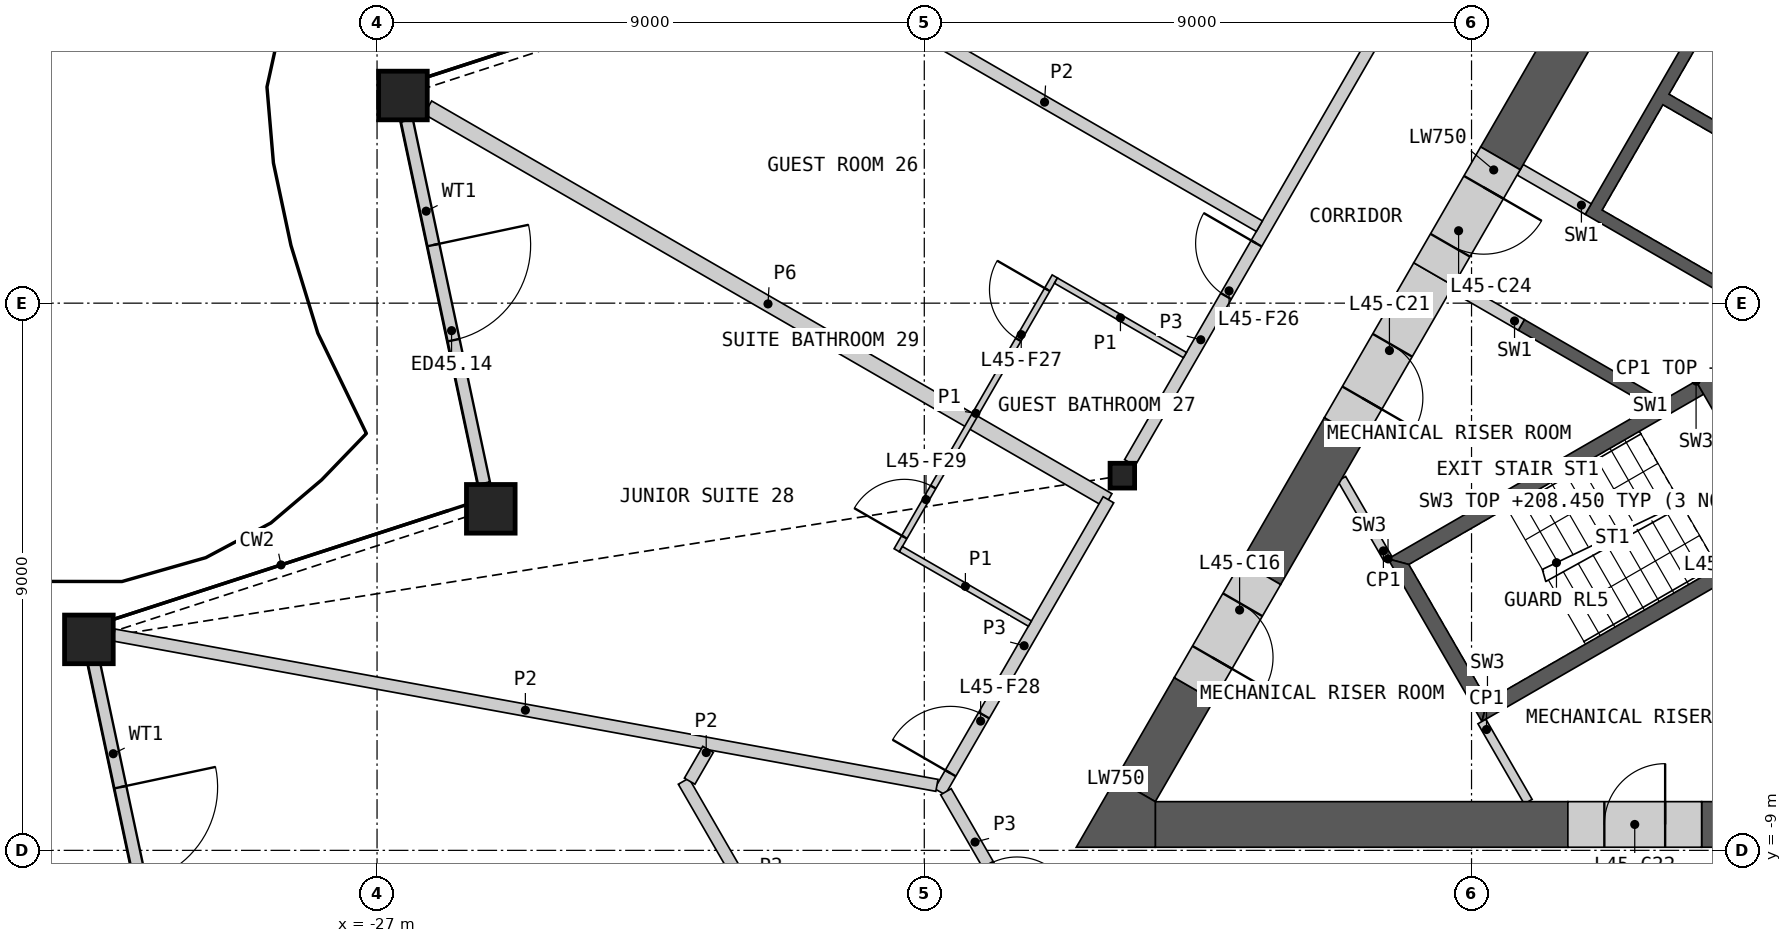
"""IFC4 building model, lengths in metres.
Left out: names, types, materials, properties, quantities, classifications, styles, units other than length and angle.
Written with IfcOpenShell. Run it as: python <this file> out.ifc"""

import sys

from ifc_helpers import new_model, si_unit, direction, frame, frame_2d, origin, origin_2d, place, context, subcontext, project, spatial, polyline, rectangle, hollow_rectangle, i_section, outline, extrude, element, fill, save


model = new_model("IFC4")
c1 = context("Model", 3, precision=1e-05, world=origin(), true_north=direction((0.0, 1.0)))
c2 = subcontext(c1, "Body", "Model", "MODEL_VIEW")
j1 = project(units=[si_unit("LENGTHUNIT", "METRE"), si_unit("PLANEANGLEUNIT", "RADIAN")], contexts=[c1])
p1 = place(None, origin())
s1 = spatial("IfcSite", under=j1, at=p1, CompositionType="ELEMENT")
p2 = place(p1, origin())
s2 = spatial("IfcBuilding", under=s1, at=p2, CompositionType="ELEMENT")
p3 = place(p2, frame((0.0, 0.0, 205.2)))
s3 = spatial("IfcBuildingStorey", under=s2, at=p3, CompositionType="ELEMENT", Elevation=205.2)
for number, where, z_axis, x_axis in (
    (1, (-26.574, 3.415, 0.0), (0.0, 0.0, 1.0), (1.0, 0.0, 0.0)),
    (2, (-25.129, -3.383, 0.0), (0.0, 0.0, 1.0), (1.0, 0.0, 0.0)),
    (3, (-31.739, -5.53, 0.0), (0.0, 0.0, 1.0), (1.0, 0.0, 0.0)),
):
    element("IfcColumn", number, at=place(p3, frame(where, z_axis=z_axis, x_axis=x_axis)), inside=s3, PredefinedType="COLUMN", context=c2, shape_type="SweptSolid", body=[
        extrude(hollow_rectangle(XDim=0.8, YDim=0.8, WallThickness=0.05, at=origin_2d()), origin(), (0.0, 0.0, 1.0), 3.6),
    ])
p4 = place(p3, frame((-14.743, -2.837, 0.0), z_axis=(0.0, 0.0, 1.0), x_axis=(1.0, 0.0, 0.0)))
e4 = element("IfcColumn", 4, at=p4, inside=s3, PredefinedType="COLUMN", context=c2, shape_type="SweptSolid", body=[
    extrude(i_section(OverallWidth=0.404, OverallDepth=0.407, WebThickness=0.027, FlangeThickness=0.044, at=origin_2d()), origin(), (0.0, 0.0, 1.0), 3.6),
])
p5 = place(p3, frame((-26.51, 3.006, 0.0), z_axis=(0.0, 0.0, 1.0), x_axis=(0.207920445063, -0.978145739921, 0.0)))
e5 = element("IfcWall", 5, at=p5, inside=s3, PredefinedType="SOLIDWALL", context=c2, shape_type="SweptSolid", body=[
    extrude(rectangle(XDim=6.106, YDim=0.2, at=frame_2d((3.053, 0.0))), origin(), (0.0, 0.0, 1.0), 2.701),
])
p6 = place(p5, frame((2.096, 0.0, 0.0)))
e6 = element("IfcOpeningElement", 6, at=p6, cuts=e5, PredefinedType="OPENING", context=c2, shape_type="SweptSolid", body=[
    extrude(rectangle(XDim=1.6, YDim=2.4, at=frame_2d((0.8, 1.2))), frame((0.0, 0.11, 0.0), z_axis=(0.0, -1.0, 0.0), x_axis=(1.0, 0.0, 0.0)), (0.0, 0.0, 1.0), 0.22),
])
p7 = place(p3, frame((-31.657, -5.91, 0.0), z_axis=(0.0, 0.0, 1.0), x_axis=(0.207917293494, -0.978146409831, 0.0)))
e7 = element("IfcWall", 7, at=p7, inside=s3, PredefinedType="SOLIDWALL", context=c2, shape_type="SweptSolid", body=[
    extrude(rectangle(XDim=6.135, YDim=0.2, at=frame_2d((3.068, 0.0))), origin(), (0.0, 0.0, 1.0), 2.701),
])
p8 = place(p7, frame((2.096, 0.0, 0.0)))
e8 = element("IfcOpeningElement", 8, at=p8, cuts=e7, PredefinedType="OPENING", context=c2, shape_type="SweptSolid", body=[
    extrude(rectangle(XDim=1.6, YDim=2.4, at=frame_2d((0.8, 1.2))), frame((0.0, 0.11, 0.0), z_axis=(0.0, -1.0, 0.0), x_axis=(1.0, 0.0, 0.0)), (0.0, 0.0, 1.0), 0.22),
])
p9 = place(p3, origin())
e9 = element("IfcWall", 9, at=p9, inside=s3, PredefinedType="SHEAR", context=c2, shape_type="SweptSolid", body=[
    extrude(outline(polyline([(-6.061, -1.697), (-8.231, -0.444), (-8.131, -0.271), (-5.96, -1.524), (-6.061, -1.697)])), origin(), (0.0, 0.0, 1.0), 3.25),
])
p10 = place(p3, origin())
e10 = element("IfcWall", 10, at=p10, inside=s3, PredefinedType="SHEAR", context=c2, shape_type="SweptSolid", body=[
    extrude(outline(polyline([(-4.96, 0.208), (-7.131, 1.461), (-3.731, 7.35), (-1.561, 6.097), (-1.66, 5.924), (-3.652, 7.074), (-4.652, 5.342), (-2.66, 4.192), (-2.76, 4.019), (-4.752, 5.169), (-5.752, 3.437), (-3.76, 2.287), (-3.861, 2.113), (-5.852, 3.263), (-6.852, 1.531), (-4.861, 0.381), (-4.96, 0.208)])), origin(), (0.0, 0.0, 1.0), 3.25),
])
for number, where, z_axis, x_axis in (
    (11, (-7.081, 1.548, 0.0), (0.0, 0.0, 1.0), (-0.866, 0.5, 0.0)),
    (12, (-8.181, -0.357, 0.0), (0.0, 0.0, 1.0), (-0.866, 0.5, 0.0)),
):
    element("IfcWall", number, at=place(p3, frame(where, z_axis=z_axis, x_axis=x_axis)), inside=s3, PredefinedType="SHEAR", context=c2, shape_type="SweptSolid", body=[
        extrude(rectangle(XDim=1.293, YDim=0.2, at=frame_2d((0.646, 0.0))), origin(), (0.0, 0.0, 1.0), 3.25),
    ])
p11 = place(p3, origin())
e13 = element("IfcWall", 13, at=p11, inside=s3, PredefinedType="SHEAR", context=c2, shape_type="SweptSolid", body=[
    extrude(outline(polyline([(-5.307, -1.281), (-10.374, -4.206), (-10.032, -4.298), (-5.182, -1.498), (-5.307, -1.281)])), origin(), (0.0, 0.0, 1.0), 3.25),
])
p12 = place(p3, origin())
e14 = element("IfcWall", 14, at=p12, inside=s3, PredefinedType="SHEAR", context=c2, shape_type="SweptSolid", body=[
    extrude(outline(polyline([(-10.374, -4.206), (-8.83, -6.881), (-8.738, -6.539), (-10.032, -4.298), (-10.374, -4.206)])), origin(), (0.0, 0.0, 1.0), 3.25),
])
p13 = place(p3, origin())
e15 = element("IfcWall", 15, at=p13, inside=s3, PredefinedType="SHEAR", context=c2, shape_type="SweptSolid", body=[
    extrude(outline(polyline([(-8.738, -6.539), (-8.83, -6.881), (-3.763, -3.956), (-3.888, -3.739), (-8.738, -6.539)])), origin(), (0.0, 0.0, 1.0), 3.25),
])
p14 = place(p3, frame((-5.199, -1.219, 0.0), z_axis=(0.0, 0.0, 1.0), x_axis=(0.499982516597, -0.866035497597, 0.0)))
e16 = element("IfcWall", 16, at=p14, inside=s3, PredefinedType="SHEAR", context=c2, shape_type="SweptSolid", body=[
    extrude(rectangle(XDim=3.088, YDim=0.25, at=frame_2d((1.544, 0.0))), origin(), (0.0, 0.0, 1.0), 3.25),
])
p15 = place(p14, frame((0.994, 0.0, 0.0)))
e17 = element("IfcOpeningElement", 17, at=p15, cuts=e16, PredefinedType="OPENING", context=c2, shape_type="SweptSolid", body=[
    extrude(rectangle(XDim=1.1, YDim=2.1, at=frame_2d((0.55, 1.05))), frame((0.0, 0.135, 0.0), z_axis=(0.0, -1.0, 0.0), x_axis=(1.0, 0.0, 0.0)), (0.0, 0.0, 1.0), 0.27),
])
for number, where, z_axis, x_axis in (
    (18, (-8.83, -6.881, 0.0), (0.0, 0.0, 1.0), (0.5, -0.866, 0.0)),
    (19, (-10.374, -4.206, 0.0), (0.0, 0.0, 1.0), (-0.5, 0.866, 0.0)),
):
    element("IfcWall", number, at=place(p3, frame(where, z_axis=z_axis, x_axis=x_axis)), inside=s3, PredefinedType="PARTITIONING", context=c2, shape_type="SweptSolid", body=[
        extrude(rectangle(XDim=1.522, YDim=0.15, at=frame_2d((0.761, 0.0))), origin(), (0.0, 0.0, 1.0), 3.25),
    ])
p16 = place(p3, frame((-14.201, -8.574, 0.0), z_axis=(0.0, 0.0, 1.0), x_axis=(1.0, 0.0, 0.0)))
e20 = element("IfcWall", 20, at=p16, inside=s3, PredefinedType="SHEAR", context=c2, shape_type="SweptSolid", body=[
    extrude(rectangle(XDim=6.785, YDim=0.75, at=frame_2d((3.393, 0.0))), origin(), (0.0, 0.0, 1.0), 3.25),
])
p17 = place(p3, frame((-5.216, -8.574, 0.0), z_axis=(0.0, 0.0, 1.0), x_axis=(1.0, 0.0, 0.0)))
e21 = element("IfcWall", 21, at=p17, inside=s3, PredefinedType="SHEAR", context=c2, shape_type="SweptSolid", body=[
    extrude(rectangle(XDim=1.816, YDim=0.75, at=frame_2d((0.908, 0.0))), origin(), (0.0, 0.0, 1.0), 3.25),
])
p18 = place(p3, frame((-7.006, 5.012, 0.0), z_axis=(0.0, 0.0, 1.0), x_axis=(-0.49996826437, -0.866043725583, 0.0)))
e22 = element("IfcWall", 22, at=p18, inside=s3, PredefinedType="SHEAR", context=c2, shape_type="SweptSolid", body=[
    extrude(rectangle(XDim=3.038, YDim=0.75, at=frame_2d((1.519, 0.0))), origin(), (0.0, 0.0, 1.0), 3.25),
])
p19 = place(p3, frame((-11.096, -2.07, 0.0), z_axis=(0.0, 0.0, 1.0), x_axis=(-0.49992834617, -0.86606676919, 0.0)))
e23 = element("IfcWall", 23, at=p19, inside=s3, PredefinedType="SHEAR", context=c2, shape_type="SweptSolid", body=[
    extrude(rectangle(XDim=2.737, YDim=0.75, at=frame_2d((1.369, 0.0))), origin(), (0.0, 0.0, 1.0), 3.25),
])
p20 = place(p3, frame((-13.564, -6.346, 0.0), z_axis=(0.0, 0.0, 1.0), x_axis=(-0.499989888488, -0.86603124159, 0.0)))
e24 = element("IfcWall", 24, at=p20, inside=s3, PredefinedType="SHEAR", context=c2, shape_type="SweptSolid", body=[
    extrude(rectangle(XDim=1.923, YDim=0.75, at=frame_2d((0.961, 0.0))), origin(), (0.0, 0.0, 1.0), 3.25),
])
p21 = place(p3, origin())
e25 = element("IfcWall", 25, at=p21, inside=s3, PredefinedType="SHEAR", context=c2, shape_type="SweptSolid", body=[
    extrude(outline(polyline([(-14.851, -7.824), (-14.201, -8.199), (-14.201, -8.949), (-15.5, -8.949), (-14.851, -7.824)])), origin(), (0.0, 0.0, 1.0), 3.25),
])
p22 = place(p3, frame((-12.464, -4.441, 0.0), z_axis=(0.0, 0.0, 1.0), x_axis=(-0.499994660107, -0.866028486751, 0.0)))
e26 = element("IfcWall", 26, at=p22, inside=s3, PredefinedType="SHEAR", context=c2, shape_type="SweptSolid", body=[
    extrude(rectangle(XDim=2.2, YDim=0.75, at=frame_2d((1.1, 0.0))), origin(), (0.0, 0.0, 1.0), 3.25),
])
p23 = place(p22, frame((0.6, 0.0, 0.0)))
e27 = element("IfcOpeningElement", 27, at=p23, cuts=e26, PredefinedType="OPENING", context=c2, shape_type="SweptSolid", body=[
    extrude(rectangle(XDim=1.0, YDim=2.1, at=frame_2d((0.5, 1.05))), frame((0.0, 0.385, 0.0), z_axis=(0.0, -1.0, 0.0), x_axis=(1.0, 0.0, 0.0)), (0.0, 0.0, 1.0), 0.77),
])
p24 = place(p3, frame((-9.625, 0.477, 0.0), z_axis=(0.0, 0.0, 1.0), x_axis=(-0.500005104963, -0.866022456413, 0.0)))
e28 = element("IfcWall", 28, at=p24, inside=s3, PredefinedType="SHEAR", context=c2, shape_type="SweptSolid", body=[
    extrude(rectangle(XDim=2.941, YDim=0.75, at=frame_2d((1.47, 0.0))), origin(), (0.0, 0.0, 1.0), 3.25),
])
p25 = place(p24, frame((1.35, 0.0, 0.0)))
e29 = element("IfcOpeningElement", 29, at=p25, cuts=e28, PredefinedType="OPENING", context=c2, shape_type="SweptSolid", body=[
    extrude(rectangle(XDim=1.0, YDim=2.1, at=frame_2d((0.5, 1.05))), frame((0.0, 0.385, 0.0), z_axis=(0.0, -1.0, 0.0), x_axis=(1.0, 0.0, 0.0)), (0.0, 0.0, 1.0), 0.77),
])
p26 = place(p3, frame((-7.416, -8.574, 0.0), z_axis=(0.0, 0.0, 1.0), x_axis=(1.0, 0.0, 0.0)))
e30 = element("IfcWall", 30, at=p26, inside=s3, PredefinedType="SHEAR", context=c2, shape_type="SweptSolid", body=[
    extrude(rectangle(XDim=2.2, YDim=0.75, at=frame_2d((1.1, 0.0))), origin(), (0.0, 0.0, 1.0), 3.25),
])
p27 = place(p26, frame((0.6, 0.0, 0.0)))
e31 = element("IfcOpeningElement", 31, at=p27, cuts=e30, PredefinedType="OPENING", context=c2, shape_type="SweptSolid", body=[
    extrude(rectangle(XDim=1.0, YDim=2.1, at=frame_2d((0.5, 1.05))), frame((0.0, 0.385, 0.0), z_axis=(0.0, -1.0, 0.0), x_axis=(1.0, 0.0, 0.0)), (0.0, 0.0, 1.0), 0.77),
])
p28 = place(p3, frame((-8.525, 2.382, 0.0), z_axis=(0.0, 0.0, 1.0), x_axis=(-0.500077893725, -0.86598042715, 0.0)))
e32 = element("IfcWall", 32, at=p28, inside=s3, PredefinedType="SHEAR", context=c2, shape_type="SweptSolid", body=[
    extrude(rectangle(XDim=2.2, YDim=0.75, at=frame_2d((1.1, 0.0))), origin(), (0.0, 0.0, 1.0), 3.25),
])
p29 = place(p28, frame((0.55, 0.0, 0.0)))
e33 = element("IfcOpeningElement", 33, at=p29, cuts=e32, PredefinedType="OPENING", context=c2, shape_type="SweptSolid", body=[
    extrude(rectangle(XDim=1.1, YDim=2.1, at=frame_2d((0.55, 1.05))), frame((0.0, 0.385, 0.0), z_axis=(0.0, -1.0, 0.0), x_axis=(1.0, 0.0, 0.0)), (0.0, 0.0, 1.0), 0.77),
])
p30 = place(p3, frame((-26.164, 3.217, 0.0), z_axis=(0.0, 0.0, 1.0), x_axis=(0.866026026416, -0.499998921569, 0.0)))
e34 = element("IfcWall", 34, at=p30, inside=s3, PredefinedType="PARTITIONING", context=c2, shape_type="SweptSolid", body=[
    extrude(rectangle(XDim=12.918, YDim=0.25, at=frame_2d((6.459, 0.0))), origin(), (0.0, 0.0, 1.0), 2.404),
])
p31 = place(p3, frame((-14.619, -2.624, 0.0), z_axis=(0.0, 0.0, 1.0), x_axis=(0.50000393355, 0.866023132736, 0.0)))
e35 = element("IfcWall", 35, at=p31, inside=s3, PredefinedType="PARTITIONING", context=c2, shape_type="SweptSolid", body=[
    extrude(rectangle(XDim=9.335, YDim=0.2, at=frame_2d((4.667, 0.0))), origin(), (0.0, 0.0, 1.0), 3.25),
])
p32 = place(p31, frame((3.163, 0.0, 0.0)))
e36 = element("IfcOpeningElement", 36, at=p32, cuts=e35, PredefinedType="OPENING", context=c2, shape_type="SweptSolid", body=[
    extrude(rectangle(XDim=1.0, YDim=2.1, at=frame_2d((0.5, 1.05))), frame((0.0, 0.11, 0.0), z_axis=(0.0, -1.0, 0.0), x_axis=(1.0, 0.0, 0.0)), (0.0, 0.0, 1.0), 0.22),
])
p33 = place(p3, frame((-17.744, -8.035, 0.0), z_axis=(0.0, 0.0, 1.0), x_axis=(0.500003221507, 0.866023543838, 0.0)))
e37 = element("IfcWall", 37, at=p33, inside=s3, PredefinedType="PARTITIONING", context=c2, shape_type="SweptSolid", body=[
    extrude(rectangle(XDim=5.545, YDim=0.2, at=frame_2d((2.772, 0.0))), origin(), (0.0, 0.0, 1.0), 3.25),
])
p34 = place(p33, frame((0.351, 0.0, 0.0)))
e38 = element("IfcOpeningElement", 38, at=p34, cuts=e37, PredefinedType="OPENING", context=c2, shape_type="SweptSolid", body=[
    extrude(rectangle(XDim=1.1, YDim=2.1, at=frame_2d((0.55, 1.05))), frame((0.0, 0.11, 0.0), z_axis=(0.0, -1.0, 0.0), x_axis=(1.0, 0.0, 0.0)), (0.0, 0.0, 1.0), 0.22),
])
p35 = place(p3, frame((-17.644, -8.035, 0.0), z_axis=(0.0, 0.0, 1.0), x_axis=(0.499961815444, -0.866047448526, 0.0)))
e39 = element("IfcWall", 39, at=p35, inside=s3, PredefinedType="PARTITIONING", context=c2, shape_type="SweptSolid", body=[
    extrude(rectangle(XDim=3.826, YDim=0.2, at=frame_2d((1.913, 0.0))), origin(), (0.0, 0.0, 1.0), 3.25),
])
p36 = place(p35, frame((1.386, 0.0, 0.0)))
e40 = element("IfcOpeningElement", 40, at=p36, cuts=e39, PredefinedType="OPENING", context=c2, shape_type="SweptSolid", body=[
    extrude(rectangle(XDim=0.95, YDim=2.1, at=frame_2d((0.475, 1.05))), frame((0.0, 0.11, 0.0), z_axis=(0.0, -1.0, 0.0), x_axis=(1.0, 0.0, 0.0)), (0.0, 0.0, 1.0), 0.22),
])
p37 = place(p3, frame((-31.329, -5.458, 0.0), z_axis=(0.0, 0.0, 1.0), x_axis=(0.983720538919, -0.179705039744, 0.0)))
e41 = element("IfcWall", 41, at=p37, inside=s3, PredefinedType="PARTITIONING", context=c2, shape_type="SweptSolid", body=[
    extrude(rectangle(XDim=13.761, YDim=0.2, at=frame_2d((6.88, 0.0))), origin(), (0.0, 0.0, 1.0), 2.404),
])
p38 = place(p3, frame((-19.555, 5.345, 0.0), z_axis=(0.0, 0.0, 1.0), x_axis=(0.866026623601, -0.49999788721, 0.0)))
e42 = element("IfcWall", 42, at=p38, inside=s3, PredefinedType="PARTITIONING", context=c2, shape_type="SweptSolid", body=[
    extrude(rectangle(XDim=8.159, YDim=0.2, at=frame_2d((4.079, 0.0))), origin(), (0.0, 0.0, 1.0), 2.404),
])
p39 = place(p3, frame((-21.958, -7.862, 0.0), z_axis=(0.0, 0.0, 1.0), x_axis=(0.499987304225, -0.866032733569, 0.0)))
e43 = element("IfcWall", 43, at=p39, inside=s3, PredefinedType="PARTITIONING", context=c2, shape_type="SweptSolid", body=[
    extrude(rectangle(XDim=4.176, YDim=0.2, at=frame_2d((2.088, 0.0))), origin(), (0.0, 0.0, 1.0), 2.404),
])
p40 = place(p3, frame((-21.859, -7.862, 0.0), z_axis=(0.0, 0.0, 1.0), x_axis=(0.50022374246, 0.865896187473, 0.0)))
e44 = element("IfcWall", 44, at=p40, inside=s3, PredefinedType="PARTITIONING", context=c2, shape_type="SweptSolid", body=[
    extrude(rectangle(XDim=0.604, YDim=0.2, at=frame_2d((0.302, 0.0))), origin(), (0.0, 0.0, 1.0), 2.404),
])
p41 = place(p3, frame((-18.453, -4.064, 0.0), z_axis=(0.0, 0.0, 1.0), x_axis=(0.499971721724, 0.866041729639, 0.0)))
e45 = element("IfcWall", 45, at=p41, inside=s3, PredefinedType="PARTITIONING", context=c2, shape_type="SweptSolid", body=[
    extrude(rectangle(XDim=5.2, YDim=0.1, at=frame_2d((2.6, 0.0))), origin(), (0.0, 0.0, 1.0), 2.404),
])
p42 = place(p41, frame((4.0, 0.0, 0.0)))
e46 = element("IfcOpeningElement", 46, at=p42, cuts=e45, PredefinedType="OPENING", context=c2, shape_type="SweptSolid", body=[
    extrude(rectangle(XDim=0.95, YDim=2.1, at=frame_2d((0.475, 1.05))), frame((0.0, 0.06, 0.0), z_axis=(0.0, -1.0, 0.0), x_axis=(1.0, 0.0, 0.0)), (0.0, 0.0, 1.0), 0.12),
])
p43 = place(p41, frame((0.25, 0.0, 0.0)))
e47 = element("IfcOpeningElement", 47, at=p43, cuts=e45, PredefinedType="OPENING", context=c2, shape_type="SweptSolid", body=[
    extrude(rectangle(XDim=0.95, YDim=2.1, at=frame_2d((0.475, 1.05))), frame((0.0, 0.06, 0.0), z_axis=(0.0, -1.0, 0.0), x_axis=(1.0, 0.0, 0.0)), (0.0, 0.0, 1.0), 0.12),
])
p44 = place(p3, frame((-15.835, 0.371, 0.0), z_axis=(0.0, 0.0, 1.0), x_axis=(0.866014668023, -0.500018594424, 0.0)))
e48 = element("IfcWall", 48, at=p44, inside=s3, PredefinedType="PARTITIONING", context=c2, shape_type="SweptSolid", body=[
    extrude(rectangle(XDim=2.45, YDim=0.1, at=frame_2d((1.225, 0.0))), origin(), (0.0, 0.0, 1.0), 2.404),
])
p45 = place(p3, frame((-18.385, -4.046, 0.0), z_axis=(0.0, 0.0, 1.0), x_axis=(0.866057815567, -0.499943856944, 0.0)))
e49 = element("IfcWall", 49, at=p45, inside=s3, PredefinedType="PARTITIONING", context=c2, shape_type="SweptSolid", body=[
    extrude(rectangle(XDim=2.45, YDim=0.1, at=frame_2d((1.225, 0.0))), origin(), (0.0, 0.0, 1.0), 2.404),
])
p46 = place(p6, origin())
e50 = element("IfcDoor", 50, at=p46, inside=s3, OperationType="DOUBLE_DOOR_SINGLE_SWING", PredefinedType="DOOR", context=c2, shape_type="SweptSolid", body=[
    extrude(rectangle(XDim=1.6, YDim=2.4, at=frame_2d((0.8, 1.2))), frame((0.0, 0.025, 0.0), z_axis=(0.0, -1.0, 0.0), x_axis=(1.0, 0.0, 0.0)), (0.0, 0.0, 1.0), 0.05),
])
fill(e6, e50)
p47 = place(p8, origin())
e51 = element("IfcDoor", 51, at=p47, inside=s3, OperationType="DOUBLE_DOOR_SINGLE_SWING", PredefinedType="DOOR", context=c2, shape_type="SweptSolid", body=[
    extrude(rectangle(XDim=1.6, YDim=2.4, at=frame_2d((0.8, 1.2))), frame((0.0, 0.025, 0.0), z_axis=(0.0, -1.0, 0.0), x_axis=(1.0, 0.0, 0.0)), (0.0, 0.0, 1.0), 0.05),
])
fill(e8, e51)
p48 = place(p23, origin())
e52 = element("IfcDoor", 52, at=p48, inside=s3, OperationType="SINGLE_SWING_RIGHT", PredefinedType="DOOR", context=c2, shape_type="SweptSolid", body=[
    extrude(rectangle(XDim=1.0, YDim=2.1, at=frame_2d((0.5, 1.05))), frame((0.0, 0.13, 0.0), z_axis=(0.0, -1.0, 0.0), x_axis=(1.0, 0.0, 0.0)), (0.0, 0.0, 1.0), 0.05),
])
fill(e27, e52)
p49 = place(p25, origin())
e53 = element("IfcDoor", 53, at=p49, inside=s3, OperationType="SINGLE_SWING_RIGHT", PredefinedType="DOOR", context=c2, shape_type="SweptSolid", body=[
    extrude(rectangle(XDim=1.0, YDim=2.1, at=frame_2d((0.5, 1.05))), frame((0.0, 0.13, 0.0), z_axis=(0.0, -1.0, 0.0), x_axis=(1.0, 0.0, 0.0)), (0.0, 0.0, 1.0), 0.05),
])
fill(e29, e53)
p50 = place(p27, origin())
e54 = element("IfcDoor", 54, at=p50, inside=s3, OperationType="SINGLE_SWING_RIGHT", PredefinedType="DOOR", context=c2, shape_type="SweptSolid", body=[
    extrude(rectangle(XDim=1.0, YDim=2.1, at=frame_2d((0.5, 1.05))), frame((0.0, 0.13, 0.0), z_axis=(0.0, -1.0, 0.0), x_axis=(1.0, 0.0, 0.0)), (0.0, 0.0, 1.0), 0.05),
])
fill(e31, e54)
p51 = place(p29, origin())
e55 = element("IfcDoor", 55, at=p51, inside=s3, OperationType="SINGLE_SWING_LEFT", PredefinedType="DOOR", context=c2, shape_type="SweptSolid", body=[
    extrude(rectangle(XDim=1.1, YDim=2.1, at=frame_2d((0.55, 1.05))), frame((0.0, 0.13, 0.0), z_axis=(0.0, -1.0, 0.0), x_axis=(1.0, 0.0, 0.0)), (0.0, 0.0, 1.0), 0.05),
])
fill(e33, e55)
p52 = place(p32, origin())
e56 = element("IfcDoor", 56, at=p52, inside=s3, OperationType="SINGLE_SWING_RIGHT", PredefinedType="DOOR", context=c2, shape_type="SweptSolid", body=[
    extrude(rectangle(XDim=1.0, YDim=2.1, at=frame_2d((0.5, 1.05))), frame((0.0, 0.025, 0.0), z_axis=(0.0, -1.0, 0.0), x_axis=(1.0, 0.0, 0.0)), (0.0, 0.0, 1.0), 0.05),
])
fill(e36, e56)
p53 = place(p42, origin())
e57 = element("IfcDoor", 57, at=p53, inside=s3, OperationType="SINGLE_SWING_RIGHT", PredefinedType="DOOR", context=c2, shape_type="SweptSolid", body=[
    extrude(rectangle(XDim=0.95, YDim=2.1, at=frame_2d((0.475, 1.05))), frame((0.0, 0.025, 0.0), z_axis=(0.0, -1.0, 0.0), x_axis=(1.0, 0.0, 0.0)), (0.0, 0.0, 1.0), 0.05),
])
fill(e46, e57)
p54 = place(p34, origin())
e58 = element("IfcDoor", 58, at=p54, inside=s3, OperationType="SINGLE_SWING_LEFT", PredefinedType="DOOR", context=c2, shape_type="SweptSolid", body=[
    extrude(rectangle(XDim=1.1, YDim=2.1, at=frame_2d((0.55, 1.05))), frame((0.0, 0.025, 0.0), z_axis=(0.0, -1.0, 0.0), x_axis=(1.0, 0.0, 0.0)), (0.0, 0.0, 1.0), 0.05),
])
fill(e38, e58)
p55 = place(p43, origin())
e59 = element("IfcDoor", 59, at=p55, inside=s3, OperationType="SINGLE_SWING_LEFT", PredefinedType="DOOR", context=c2, shape_type="SweptSolid", body=[
    extrude(rectangle(XDim=0.95, YDim=2.1, at=frame_2d((0.475, 1.05))), frame((0.0, 0.025, 0.0), z_axis=(0.0, -1.0, 0.0), x_axis=(1.0, 0.0, 0.0)), (0.0, 0.0, 1.0), 0.05),
])
fill(e47, e59)
save(model, sys.argv[1])
